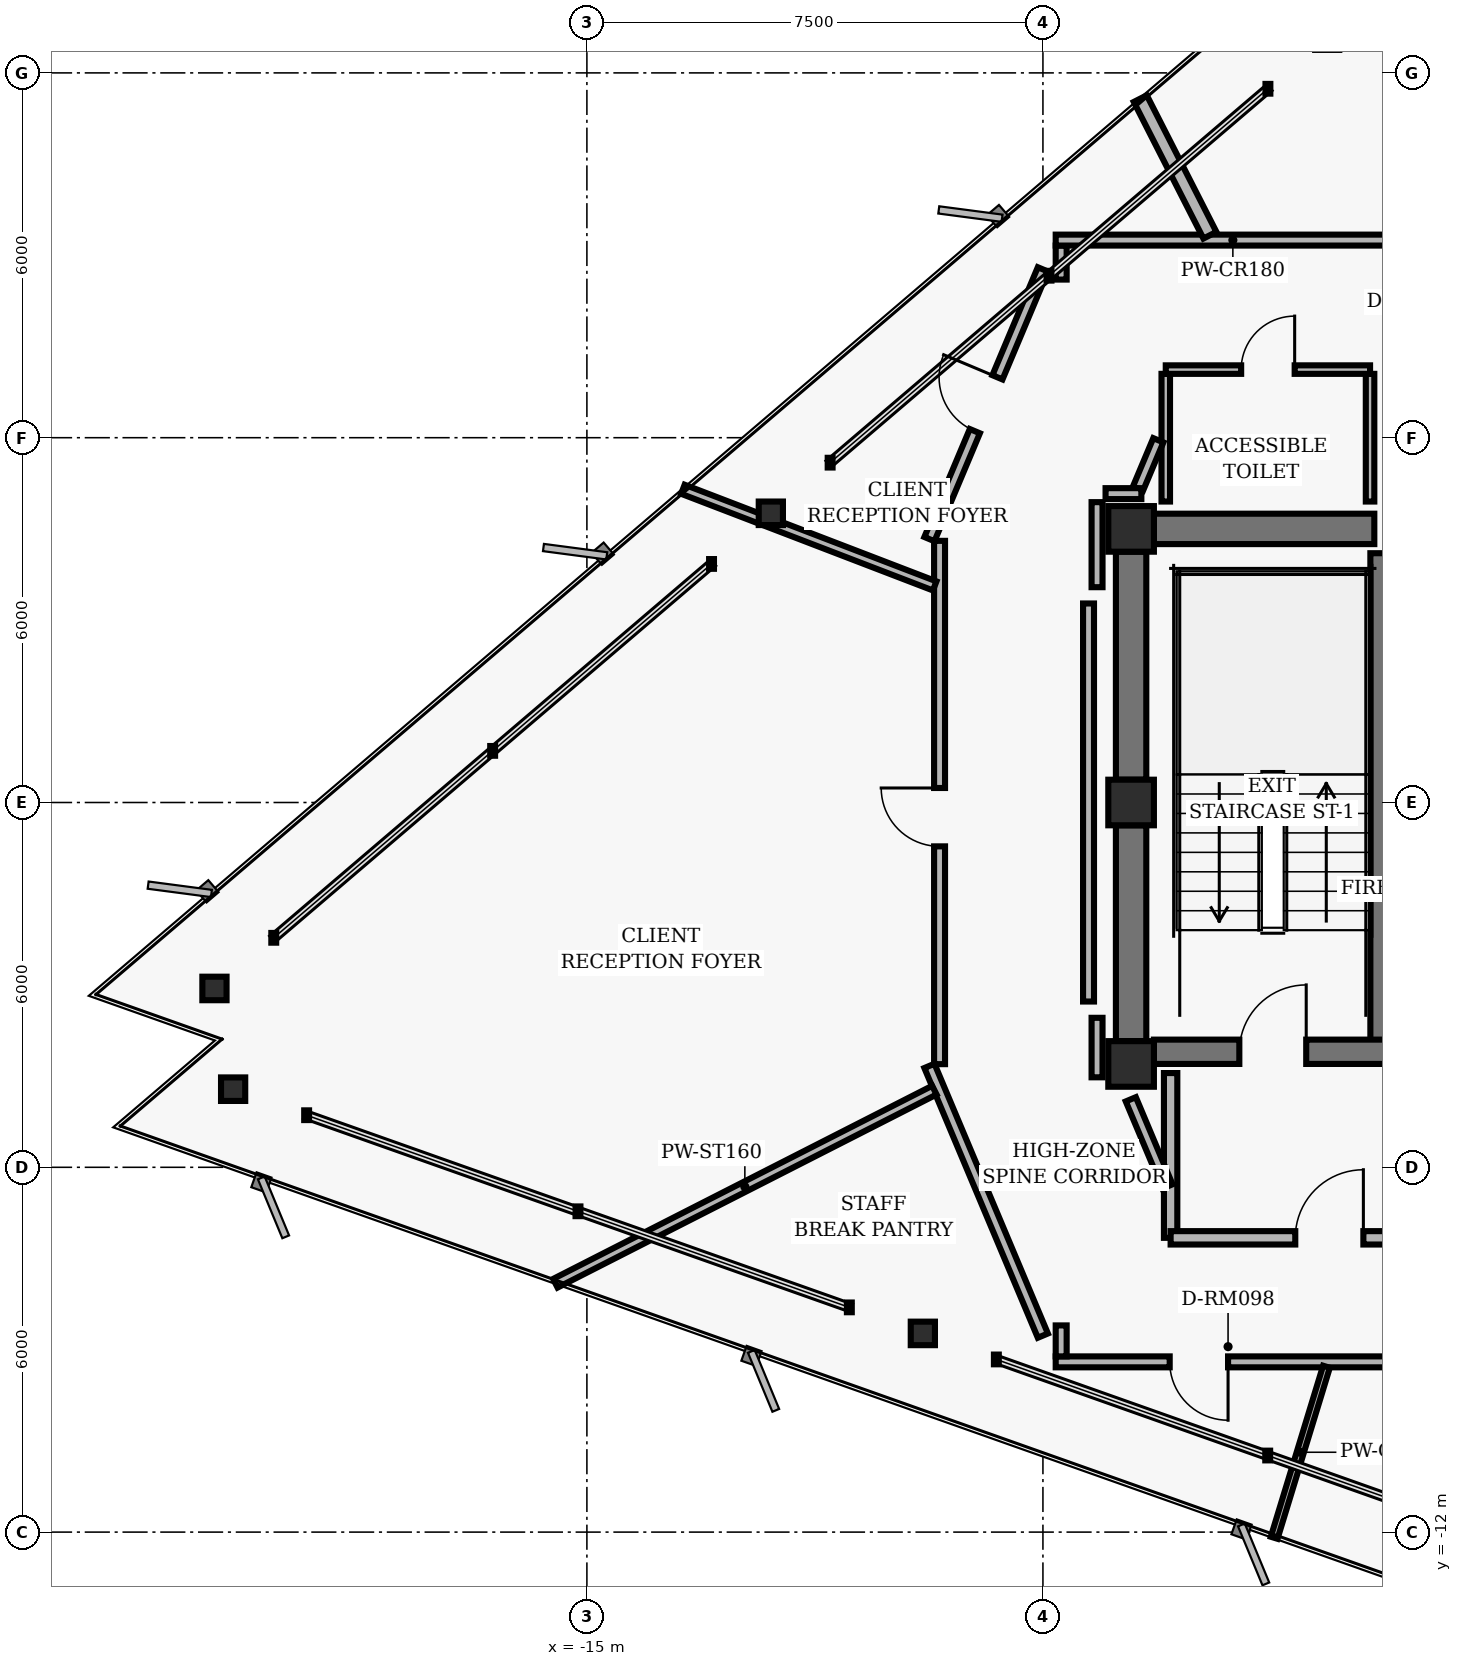
"""IFC4 building model, lengths in metres.
Left out: names, types, materials, properties, quantities, classifications, styles, units other than length and angle.
Written with IfcOpenShell. Run it as: python <this file> out.ifc"""

import sys

from ifc_helpers import new_model, si_unit, direction, frame, frame_2d, origin, origin_2d, place, context, subcontext, project, spatial, rectangle, hollow_rectangle, i_section, extrude, element, fill, save


model = new_model("IFC4")
c1 = context("Model", 3, precision=1e-05, world=origin(), true_north=direction((0.0, 1.0)))
c2 = subcontext(c1, "Body", "Model", "MODEL_VIEW")
j1 = project(units=[si_unit("LENGTHUNIT", "METRE"), si_unit("PLANEANGLEUNIT", "RADIAN")], contexts=[c1])
p1 = place(None, origin())
s1 = spatial("IfcSite", under=j1, at=p1, CompositionType="ELEMENT")
p2 = place(p1, origin())
s2 = spatial("IfcBuilding", under=s1, at=p2, CompositionType="ELEMENT")
p3 = place(p2, frame((0.0, 0.0, 175.36)))
s3 = spatial("IfcBuildingStorey", under=s2, at=p3, CompositionType="ELEMENT", Elevation=175.36)
for number, where, z_axis, x_axis in (
    (1, (-6.05, 4.5, 0.0), (0.0, 0.0, 1.0), (1.0, 0.0, 0.0)),
    (2, (-6.05, 0.0, 0.0), (0.0, 0.0, 1.0), (1.0, 0.0, 0.0)),
    (3, (-6.05, -4.3, 0.0), (0.0, 0.0, 1.0), (1.0, 0.0, 0.0)),
):
    element("IfcColumn", number, at=place(p3, frame(where, z_axis=z_axis, x_axis=x_axis)), inside=s3, PredefinedType="COLUMN", context=c2, shape_type="SweptSolid", body=[
        extrude(hollow_rectangle(XDim=0.75, YDim=0.75, WallThickness=0.05, InnerFilletRadius=0.02, OuterFilletRadius=0.04, at=origin_2d()), origin(), (0.0, 0.0, 1.0), 3.04),
    ])
p4 = place(p3, frame((-6.05, 0.375, 0.0), z_axis=(0.0, 0.0, 1.0), x_axis=(0.0, 1.0, 0.0)))
e4 = element("IfcWall", 4, at=p4, inside=s3, PredefinedType="SHEAR", context=c2, shape_type="SweptSolid", body=[
    extrude(rectangle(XDim=3.75, YDim=0.5, at=frame_2d((1.875, 0.0))), origin(), (0.0, 0.0, 1.0), 2.798),
])
p5 = place(p3, frame((-6.05, -3.925, 0.0), z_axis=(0.0, 0.0, 1.0), x_axis=(0.0, 1.0, 0.0)))
e5 = element("IfcWall", 5, at=p5, inside=s3, PredefinedType="SHEAR", context=c2, shape_type="SweptSolid", body=[
    extrude(rectangle(XDim=3.55, YDim=0.5, at=frame_2d((1.775, 0.0))), origin(), (0.0, 0.0, 1.0), 2.798),
])
p6 = place(p3, frame((-1.94, -4.1, 0.0), z_axis=(0.0, 0.0, 1.0), x_axis=(0.0, 1.0, 0.0)))
e6 = element("IfcWall", 6, at=p6, inside=s3, PredefinedType="SHEAR", context=c2, shape_type="SweptSolid", body=[
    extrude(rectangle(XDim=8.2, YDim=0.35, at=frame_2d((4.1, 0.0))), origin(), (0.0, 0.0, 1.0), 2.798),
])
p7 = place(p3, frame((-5.675, -4.1, 0.0), z_axis=(0.0, 0.0, 1.0), x_axis=(1.0, 0.0, 0.0)))
e7 = element("IfcWall", 7, at=p7, inside=s3, PredefinedType="SHEAR", context=c2, shape_type="SweptSolid", body=[
    extrude(rectangle(XDim=11.35, YDim=0.4, at=frame_2d((5.675, 0.0))), origin(), (0.0, 0.0, 1.0), 2.798),
])
p8 = place(p7, frame((1.405, 0.0, 0.0)))
e8 = element("IfcOpeningElement", 8, at=p8, cuts=e7, PredefinedType="OPENING", context=c2, shape_type="SweptSolid", body=[
    extrude(rectangle(XDim=1.1, YDim=2.04, at=frame_2d((0.55, 1.02))), frame((0.0, 0.21, 0.0), z_axis=(0.0, -1.0, 0.0), x_axis=(1.0, 0.0, 0.0)), (0.0, 0.0, 1.0), 0.42),
])
p9 = place(p7, frame((8.845, 0.0, 0.0)))
e9 = element("IfcOpeningElement", 9, at=p9, cuts=e7, PredefinedType="OPENING", context=c2, shape_type="SweptSolid", body=[
    extrude(rectangle(XDim=1.1, YDim=2.04, at=frame_2d((0.55, 1.02))), frame((0.0, 0.21, 0.0), z_axis=(0.0, -1.0, 0.0), x_axis=(1.0, 0.0, 0.0)), (0.0, 0.0, 1.0), 0.42),
])
p10 = place(p7, frame((4.145, 0.0, 0.0)))
e10 = element("IfcOpeningElement", 10, at=p10, cuts=e7, PredefinedType="OPENING", context=c2, shape_type="SweptSolid", body=[
    extrude(rectangle(XDim=1.06, YDim=2.04, at=frame_2d((0.53, 1.02))), frame((0.0, 0.21, 0.0), z_axis=(0.0, -1.0, 0.0), x_axis=(1.0, 0.0, 0.0)), (0.0, 0.0, 1.0), 0.42),
])
p11 = place(p7, frame((6.145, 0.0, 0.0)))
e11 = element("IfcOpeningElement", 11, at=p11, cuts=e7, PredefinedType="OPENING", context=c2, shape_type="SweptSolid", body=[
    extrude(rectangle(XDim=1.06, YDim=2.04, at=frame_2d((0.53, 1.02))), frame((0.0, 0.21, 0.0), z_axis=(0.0, -1.0, 0.0), x_axis=(1.0, 0.0, 0.0)), (0.0, 0.0, 1.0), 0.42),
])
p12 = place(p3, frame((-5.675, 4.5, 0.0), z_axis=(0.0, 0.0, 1.0), x_axis=(1.0, 0.0, 0.0)))
e12 = element("IfcWall", 12, at=p12, inside=s3, PredefinedType="SHEAR", context=c2, shape_type="SweptSolid", body=[
    extrude(rectangle(XDim=3.625, YDim=0.5, at=frame_2d((1.812, 0.0))), origin(), (0.0, 0.0, 1.0), 2.798),
])
for number, where, z_axis, x_axis in (
    (13, (-11.975, 4.757, 0.0), (0.0, 0.0, 1.0), (1.0, 0.0, 0.0)),
    (14, (-21.125, -3.059, 0.0), (0.0, 0.0, 1.0), (1.0, 0.0, 0.0)),
    (15, (-20.818, -4.715, 0.0), (0.0, 0.0, 1.0), (1.0, 0.0, 0.0)),
    (16, (-9.475, -8.732, 0.0), (0.0, 0.0, 1.0), (1.0, 0.0, 0.0)),
):
    element("IfcColumn", number, at=place(p3, frame(where, z_axis=z_axis, x_axis=x_axis)), inside=s3, PredefinedType="COLUMN", context=c2, shape_type="SweptSolid", body=[
        extrude(i_section(OverallWidth=0.398, OverallDepth=0.387, WebThickness=0.021, FlangeThickness=0.033, FilletRadius=0.018, at=origin_2d()), origin(), (0.0, 0.0, 1.0), 3.04),
    ])
p13 = place(p3, frame((-5.4, -7.16, 0.0), z_axis=(0.0, 0.0, 1.0), x_axis=(0.0, 1.0, 0.0)))
e17 = element("IfcWall", 17, at=p13, inside=s3, PredefinedType="PARTITIONING", context=c2, shape_type="SweptSolid", body=[
    extrude(rectangle(XDim=2.71, YDim=0.22, at=frame_2d((1.355, 0.0))), origin(), (0.0, 0.0, 1.0), 2.773),
])
p14 = place(p3, frame((-5.4, -7.16, 0.0), z_axis=(0.0, 0.0, 1.0), x_axis=(1.0, 0.0, 0.0)))
e18 = element("IfcWall", 18, at=p14, inside=s3, PredefinedType="PARTITIONING", context=c2, shape_type="SweptSolid", body=[
    extrude(rectangle(XDim=5.4, YDim=0.22, at=frame_2d((2.7, 0.0))), origin(), (0.0, 0.0, 1.0), 2.395),
])
p15 = place(p14, frame((2.05, 0.0, 0.0)))
e19 = element("IfcOpeningElement", 19, at=p15, cuts=e18, PredefinedType="OPENING", context=c2, shape_type="SweptSolid", body=[
    extrude(rectangle(XDim=1.12, YDim=2.02, at=frame_2d((0.56, 1.01))), frame((0.0, 0.12, 0.0), z_axis=(0.0, -1.0, 0.0), x_axis=(1.0, 0.0, 0.0)), (0.0, 0.0, 1.0), 0.24),
])
for number, where, z_axis, x_axis in (
    (20, (-5.48, 4.95, 0.0), (0.0, 0.0, 1.0), (0.0, 1.0, 0.0)),
    (21, (-2.12, 4.95, 0.0), (0.0, 0.0, 1.0), (0.0, 1.0, 0.0)),
):
    element("IfcWall", number, at=place(p3, frame(where, z_axis=z_axis, x_axis=x_axis)), inside=s3, PredefinedType="PARTITIONING", context=c2, shape_type="SweptSolid", body=[
        extrude(rectangle(XDim=2.1, YDim=0.14, at=frame_2d((1.05, 0.0))), origin(), (0.0, 0.0, 1.0), 2.773),
    ])
p16 = place(p3, frame((-5.48, 7.12, 0.0), z_axis=(0.0, 0.0, 1.0), x_axis=(1.0, 0.0, 0.0)))
e22 = element("IfcWall", 22, at=p16, inside=s3, PredefinedType="PARTITIONING", context=c2, shape_type="SweptSolid", body=[
    extrude(rectangle(XDim=3.36, YDim=0.14, at=frame_2d((1.68, 0.0))), origin(), (0.0, 0.0, 1.0), 2.773),
])
p17 = place(p16, frame((1.24, 0.0, 0.0)))
e23 = element("IfcOpeningElement", 23, at=p17, cuts=e22, PredefinedType="OPENING", context=c2, shape_type="SweptSolid", body=[
    extrude(rectangle(XDim=0.88, YDim=2.02, at=frame_2d((0.44, 1.01))), frame((0.0, 0.08, 0.0), z_axis=(0.0, -1.0, 0.0), x_axis=(1.0, 0.0, 0.0)), (0.0, 0.0, 1.0), 0.16),
])
p18 = place(p3, frame((-7.501, -8.769, 0.0), z_axis=(0.0, 0.0, 1.0), x_axis=(-0.387573945081, 0.921838617706, 0.0)))
e24 = element("IfcWall", 24, at=p18, inside=s3, PredefinedType="PARTITIONING", context=c2, shape_type="SweptSolid", body=[
    extrude(rectangle(XDim=4.813, YDim=0.18, at=frame_2d((2.407, 0.0))), origin(), (0.0, 0.0, 1.0), 2.773),
])
p19 = place(p3, frame((-9.2, -4.303, 0.0), z_axis=(0.0, 0.0, 1.0), x_axis=(0.0, 1.0, 0.0)))
e25 = element("IfcWall", 25, at=p19, inside=s3, PredefinedType="PARTITIONING", context=c2, shape_type="SweptSolid", body=[
    extrude(rectangle(XDim=8.607, YDim=0.18, at=frame_2d((4.303, 0.0))), origin(), (0.0, 0.0, 1.0), 2.773),
])
p20 = place(p19, frame((3.582, 0.0, 0.0)))
e26 = element("IfcOpeningElement", 26, at=p20, cuts=e25, PredefinedType="OPENING", context=c2, shape_type="SweptSolid", body=[
    extrude(rectangle(XDim=0.96, YDim=2.02, at=frame_2d((0.48, 1.01))), frame((0.0, 0.1, 0.0), z_axis=(0.0, -1.0, 0.0), x_axis=(1.0, 0.0, 0.0)), (0.0, 0.0, 1.0), 0.2),
])
p21 = place(p3, frame((-9.367, 4.332, 0.0), z_axis=(0.0, 0.0, 1.0), x_axis=(0.387573945081, 0.921838617706, 0.0)))
e27 = element("IfcWall", 27, at=p21, inside=s3, PredefinedType="PARTITIONING", context=c2, shape_type="SweptSolid", body=[
    extrude(rectangle(XDim=4.813, YDim=0.18, at=frame_2d((2.407, 0.0))), origin(), (0.0, 0.0, 1.0), 2.395),
])
p22 = place(p21, frame((1.927, 0.0, 0.0)))
e28 = element("IfcOpeningElement", 28, at=p22, cuts=e27, PredefinedType="OPENING", context=c2, shape_type="SweptSolid", body=[
    extrude(rectangle(XDim=0.96, YDim=2.02, at=frame_2d((0.48, 1.01))), frame((0.0, 0.1, 0.0), z_axis=(0.0, -1.0, 0.0), x_axis=(1.0, 0.0, 0.0)), (0.0, 0.0, 1.0), 0.2),
])
p23 = place(p3, frame((-7.2, 8.601, 0.0), z_axis=(0.0, 0.0, 1.0), x_axis=(0.0, 1.0, 0.0)))
e29 = element("IfcWall", 29, at=p23, inside=s3, PredefinedType="PARTITIONING", context=c2, shape_type="SweptSolid", body=[
    extrude(rectangle(XDim=0.559, YDim=0.18, at=frame_2d((0.28, 0.0))), origin(), (0.0, 0.0, 1.0), 2.773),
])
p24 = place(p3, frame((-7.29, 9.25, 0.0), z_axis=(0.0, 0.0, 1.0), x_axis=(1.0, 0.0, 0.0)))
e30 = element("IfcWall", 30, at=p24, inside=s3, PredefinedType="PARTITIONING", context=c2, shape_type="SweptSolid", body=[
    extrude(rectangle(XDim=13.3, YDim=0.18, at=frame_2d((6.65, 0.0))), origin(), (0.0, 0.0, 1.0), 2.773),
])
p25 = place(p24, frame((11.113, 0.0, 0.0)))
e31 = element("IfcOpeningElement", 31, at=p25, cuts=e30, PredefinedType="OPENING", context=c2, shape_type="SweptSolid", body=[
    extrude(rectangle(XDim=0.96, YDim=2.02, at=frame_2d((0.48, 1.01))), frame((0.0, 0.1, 0.0), z_axis=(0.0, -1.0, 0.0), x_axis=(1.0, 0.0, 0.0)), (0.0, 0.0, 1.0), 0.2),
])
p26 = place(p24, frame((5.827, 0.0, 0.0)))
e32 = element("IfcOpeningElement", 32, at=p26, cuts=e30, PredefinedType="OPENING", context=c2, shape_type="SweptSolid", body=[
    extrude(rectangle(XDim=1.02, YDim=2.02, at=frame_2d((0.51, 1.01))), frame((0.0, 0.1, 0.0), z_axis=(0.0, -1.0, 0.0), x_axis=(1.0, 0.0, 0.0)), (0.0, 0.0, 1.0), 0.2),
])
p27 = place(p3, frame((-5.602, 5.958, 0.0), z_axis=(0.0, 0.0, 1.0), x_axis=(-0.387588639363, -0.921832439566, 0.0)))
e33 = element("IfcWall", 33, at=p27, inside=s3, PredefinedType="PARTITIONING", context=c2, shape_type="SweptSolid", body=[
    extrude(rectangle(XDim=0.862, YDim=0.18, at=frame_2d((0.431, 0.0))), origin(), (0.0, 0.0, 1.0), 2.773),
])
p28 = place(p3, frame((-5.881, 5.08, 0.0), z_axis=(0.0, 0.0, 1.0), x_axis=(-1.0, 0.0, 0.0)))
e34 = element("IfcWall", 34, at=p28, inside=s3, PredefinedType="PARTITIONING", context=c2, shape_type="SweptSolid", body=[
    extrude(rectangle(XDim=0.589, YDim=0.18, at=frame_2d((0.294, 0.0))), origin(), (0.0, 0.0, 1.0), 2.773),
])
p29 = place(p3, frame((-6.61, 4.94, 0.0), z_axis=(0.0, 0.0, 1.0), x_axis=(0.0, -1.0, 0.0)))
e35 = element("IfcWall", 35, at=p29, inside=s3, PredefinedType="PARTITIONING", context=c2, shape_type="SweptSolid", body=[
    extrude(rectangle(XDim=1.399, YDim=0.18, at=frame_2d((0.699, 0.0))), origin(), (0.0, 0.0, 1.0), 2.773),
])
p30 = place(p3, frame((-6.75, 3.273, 0.0), z_axis=(0.0, 0.0, 1.0), x_axis=(0.0, -1.0, 0.0)))
e36 = element("IfcWall", 36, at=p30, inside=s3, PredefinedType="PARTITIONING", context=c2, shape_type="SweptSolid", body=[
    extrude(rectangle(XDim=6.547, YDim=0.18, at=frame_2d((3.273, 0.0))), origin(), (0.0, 0.0, 1.0), 2.773),
])
p31 = place(p3, frame((-6.61, -3.541, 0.0), z_axis=(0.0, 0.0, 1.0), x_axis=(0.0, -1.0, 0.0)))
e37 = element("IfcWall", 37, at=p31, inside=s3, PredefinedType="PARTITIONING", context=c2, shape_type="SweptSolid", body=[
    extrude(rectangle(XDim=0.979, YDim=0.18, at=frame_2d((0.489, 0.0))), origin(), (0.0, 0.0, 1.0), 2.773),
])
p32 = place(p3, frame((-6.055, -4.882, 0.0), z_axis=(0.0, 0.0, 1.0), x_axis=(0.387579540458, -0.921836265189, 0.0)))
e38 = element("IfcWall", 38, at=p32, inside=s3, PredefinedType="PARTITIONING", context=c2, shape_type="SweptSolid", body=[
    extrude(rectangle(XDim=1.555, YDim=0.18, at=frame_2d((0.777, 0.0))), origin(), (0.0, 0.0, 1.0), 2.773),
])
p33 = place(p3, frame((6.01, -9.2, 0.0), z_axis=(0.0, 0.0, 1.0), x_axis=(-1.0, 0.0, 0.0)))
e39 = element("IfcWall", 39, at=p33, inside=s3, PredefinedType="PARTITIONING", context=c2, shape_type="SweptSolid", body=[
    extrude(rectangle(XDim=13.3, YDim=0.18, at=frame_2d((6.65, 0.0))), origin(), (0.0, 0.0, 1.0), 2.395),
])
p34 = place(p33, frame((10.465, 0.0, 0.0)))
e40 = element("IfcOpeningElement", 40, at=p34, cuts=e39, PredefinedType="OPENING", context=c2, shape_type="SweptSolid", body=[
    extrude(rectangle(XDim=0.96, YDim=2.02, at=frame_2d((0.48, 1.01))), frame((0.0, 0.1, 0.0), z_axis=(0.0, -1.0, 0.0), x_axis=(1.0, 0.0, 0.0)), (0.0, 0.0, 1.0), 0.2),
])
p35 = place(p33, frame((4.373, 0.0, 0.0)))
e41 = element("IfcOpeningElement", 41, at=p35, cuts=e39, PredefinedType="OPENING", context=c2, shape_type="SweptSolid", body=[
    extrude(rectangle(XDim=0.96, YDim=2.02, at=frame_2d((0.48, 1.01))), frame((0.0, 0.1, 0.0), z_axis=(0.0, -1.0, 0.0), x_axis=(1.0, 0.0, 0.0)), (0.0, 0.0, 1.0), 0.2),
])
p36 = place(p3, frame((-7.2, -9.11, 0.0), z_axis=(0.0, 0.0, 1.0), x_axis=(0.0, 1.0, 0.0)))
e42 = element("IfcWall", 42, at=p36, inside=s3, PredefinedType="PARTITIONING", context=c2, shape_type="SweptSolid", body=[
    extrude(rectangle(XDim=0.51, YDim=0.18, at=frame_2d((0.255, 0.0))), origin(), (0.0, 0.0, 1.0), 2.773),
])
p37 = place(p3, frame((-9.286, -4.731, 0.0), z_axis=(0.0, 0.0, 1.0), x_axis=(-0.891002207928, -0.453998970778, 0.0)))
e43 = element("IfcWall", 43, at=p37, inside=s3, PredefinedType="PARTITIONING", context=c2, shape_type="SweptSolid", body=[
    extrude(rectangle(XDim=6.996, YDim=0.16, at=frame_2d((3.498, 0.0))), origin(), (0.0, 0.0, 1.0), 2.773),
])
p38 = place(p3, frame((-2.837, -9.28, 0.0), z_axis=(0.0, 0.0, 1.0), x_axis=(-0.292353462598, -0.95631033295, 0.0)))
e44 = element("IfcWall", 44, at=p38, inside=s3, PredefinedType="MOVABLE", context=c2, shape_type="SweptSolid", body=[
    extrude(rectangle(XDim=2.942, YDim=0.115, at=frame_2d((1.471, 0.0))), origin(), (0.0, 0.0, 1.0), 2.773),
])
p39 = place(p3, frame((-4.754, 9.33, 0.0), z_axis=(0.0, 0.0, 1.0), x_axis=(-0.453977993214, 0.891012896471, 0.0)))
e45 = element("IfcWall", 45, at=p39, inside=s3, PredefinedType="PARTITIONING", context=c2, shape_type="SweptSolid", body=[
    extrude(rectangle(XDim=2.522, YDim=0.24, at=frame_2d((1.261, 0.0))), origin(), (0.0, 0.0, 1.0), 2.773),
])
p40 = place(p3, frame((-9.28, 3.562, 0.0), z_axis=(0.0, 0.0, 1.0), x_axis=(-0.933582300371, 0.3583630679, 0.0)))
e46 = element("IfcWall", 46, at=p40, inside=s3, PredefinedType="PARTITIONING", context=c2, shape_type="SweptSolid", body=[
    extrude(rectangle(XDim=4.436, YDim=0.16, at=frame_2d((2.218, 0.0))), origin(), (0.0, 0.0, 1.0), 2.773),
])
p41 = place(p8, origin())
e47 = element("IfcDoor", 47, at=p41, inside=s3, OperationType="SINGLE_SWING_RIGHT", PredefinedType="DOOR", context=c2, shape_type="SweptSolid", body=[
    extrude(rectangle(XDim=1.1, YDim=2.04, at=frame_2d((0.55, 1.02))), frame((0.0, 0.025, 0.0), z_axis=(0.0, -1.0, 0.0), x_axis=(1.0, 0.0, 0.0)), (0.0, 0.0, 1.0), 0.05),
])
fill(e8, e47)
p42 = place(p15, origin())
e48 = element("IfcDoor", 48, at=p42, inside=s3, OperationType="SINGLE_SWING_RIGHT", PredefinedType="DOOR", context=c2, shape_type="SweptSolid", body=[
    extrude(rectangle(XDim=1.12, YDim=2.02, at=frame_2d((0.56, 1.01))), frame((0.0, 0.025, 0.0), z_axis=(0.0, -1.0, 0.0), x_axis=(1.0, 0.0, 0.0)), (0.0, 0.0, 1.0), 0.05),
])
fill(e19, e48)
p43 = place(p17, origin())
e49 = element("IfcDoor", 49, at=p43, inside=s3, OperationType="SINGLE_SWING_RIGHT", PredefinedType="DOOR", context=c2, shape_type="SweptSolid", body=[
    extrude(rectangle(XDim=0.88, YDim=2.02, at=frame_2d((0.44, 1.01))), frame((0.0, 0.025, 0.0), z_axis=(0.0, -1.0, 0.0), x_axis=(1.0, 0.0, 0.0)), (0.0, 0.0, 1.0), 0.05),
])
fill(e23, e49)
p44 = place(p20, origin())
e50 = element("IfcDoor", 50, at=p44, inside=s3, OperationType="SINGLE_SWING_RIGHT", PredefinedType="DOOR", context=c2, shape_type="SweptSolid", body=[
    extrude(rectangle(XDim=0.96, YDim=2.02, at=frame_2d((0.48, 1.01))), frame((0.0, 0.025, 0.0), z_axis=(0.0, -1.0, 0.0), x_axis=(1.0, 0.0, 0.0)), (0.0, 0.0, 1.0), 0.05),
])
fill(e26, e50)
p45 = place(p34, origin())
e51 = element("IfcDoor", 51, at=p45, inside=s3, OperationType="SINGLE_SWING_LEFT", PredefinedType="DOOR", context=c2, shape_type="SweptSolid", body=[
    extrude(rectangle(XDim=0.96, YDim=2.02, at=frame_2d((0.48, 1.01))), frame((0.0, 0.025, 0.0), z_axis=(0.0, -1.0, 0.0), x_axis=(1.0, 0.0, 0.0)), (0.0, 0.0, 1.0), 0.05),
])
fill(e40, e51)
p46 = place(p22, origin())
e52 = element("IfcDoor", 52, at=p46, inside=s3, OperationType="SINGLE_SWING_RIGHT", PredefinedType="DOOR", context=c2, shape_type="SweptSolid", body=[
    extrude(rectangle(XDim=0.96, YDim=2.02, at=frame_2d((0.48, 1.01))), frame((0.0, 0.025, 0.0), z_axis=(0.0, -1.0, 0.0), x_axis=(1.0, 0.0, 0.0)), (0.0, 0.0, 1.0), 0.05),
])
fill(e28, e52)
save(model, sys.argv[1])
